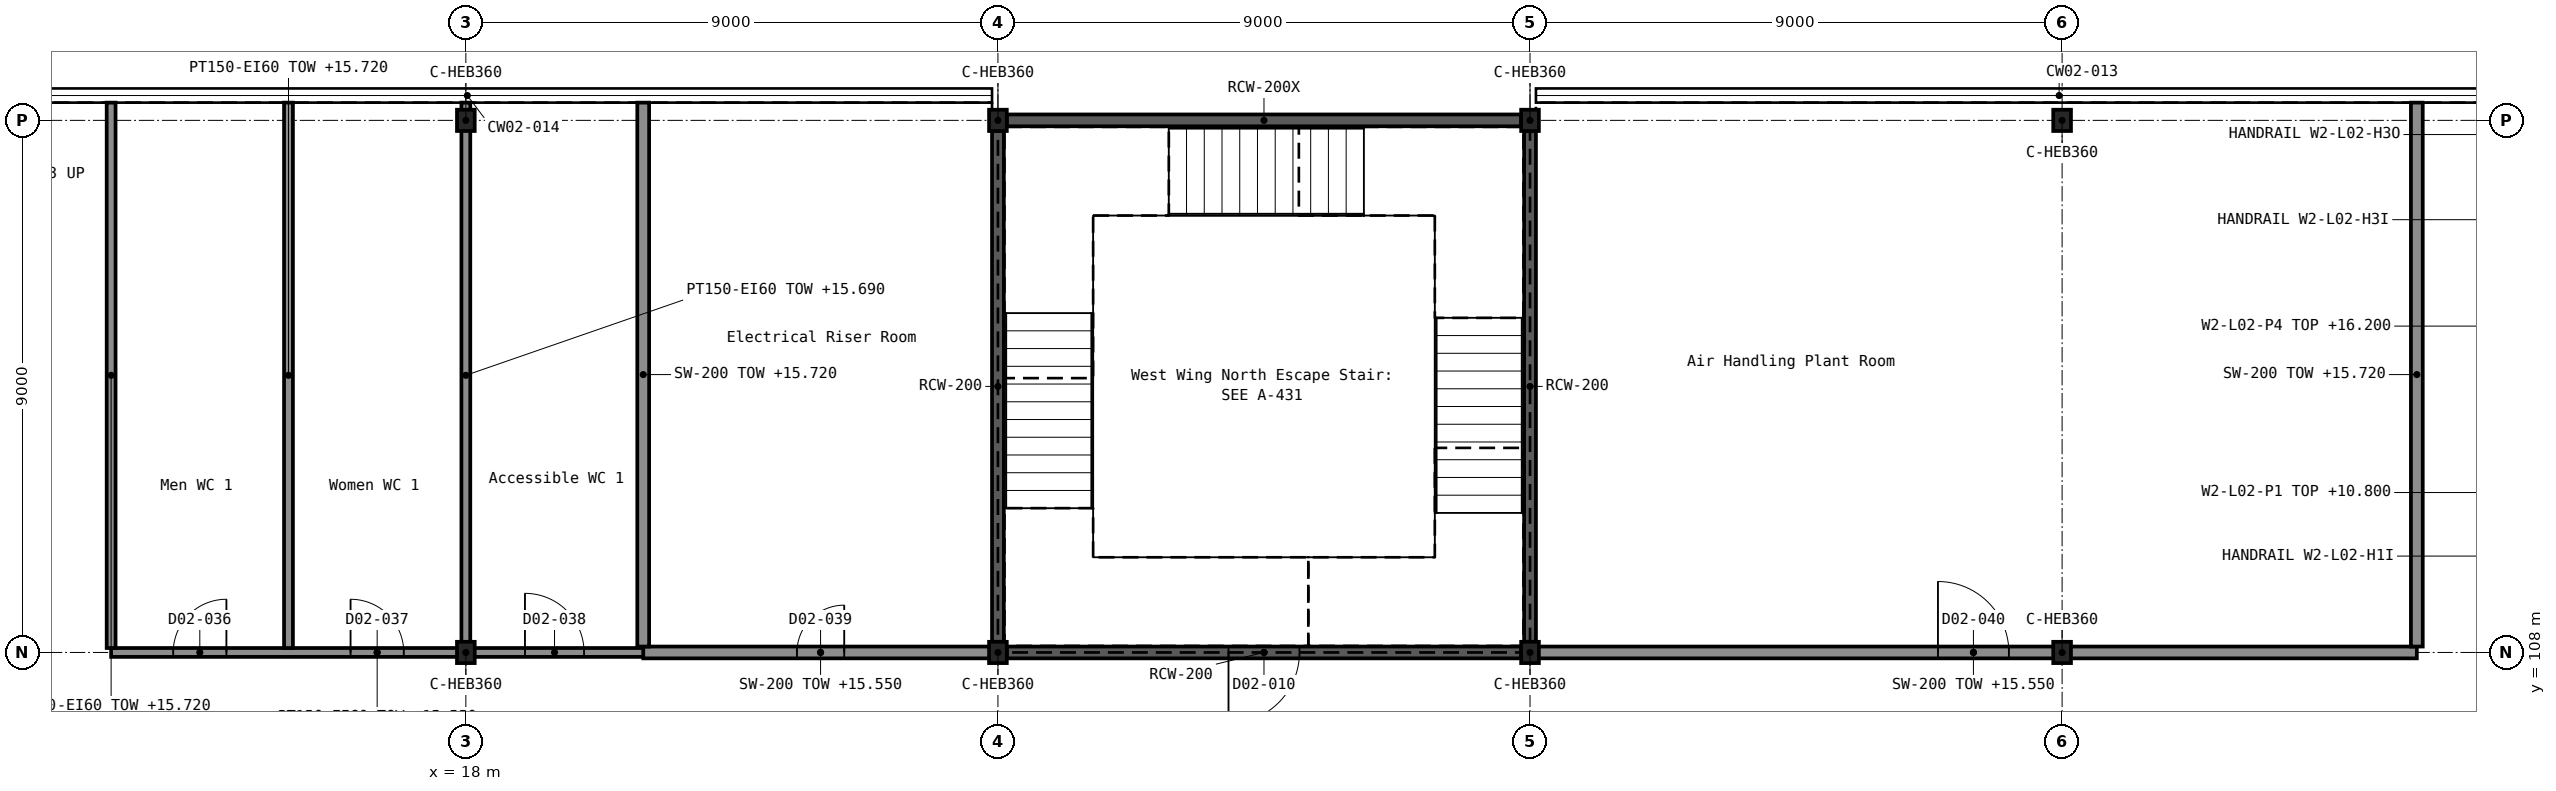
"""IFC4 building model, lengths in metres.
Left out: names, types, materials, properties, quantities, classifications, styles, units other than length and angle.
Written with IfcOpenShell. Run it as: python <this file> out.ifc"""

import sys

from ifc_helpers import new_model, si_unit, direction, frame, frame_2d, origin, origin_2d, place, context, subcontext, project, spatial, rectangle, i_section, extrude, element, fill, save


model = new_model("IFC4")
c1 = context("Model", 3, precision=1e-05, world=origin(), true_north=direction((0.0, 1.0)))
c2 = subcontext(c1, "Body", "Model", "MODEL_VIEW")
j1 = project(units=[si_unit("LENGTHUNIT", "METRE"), si_unit("PLANEANGLEUNIT", "RADIAN")], contexts=[c1])
p1 = place(None, origin())
s1 = spatial("IfcSite", under=j1, at=p1, CompositionType="ELEMENT")
p2 = place(p1, origin())
s2 = spatial("IfcBuilding", under=s1, at=p2, CompositionType="ELEMENT")
p3 = place(p2, frame((0.0, 0.0, 10.8)))
s3 = spatial("IfcBuildingStorey", under=s2, at=p3, CompositionType="ELEMENT", Elevation=10.8)
for number, where, z_axis, x_axis in (
    (1, (18.0, 108.0, 0.0), (0.0, 0.0, 1.0), (1.0, 0.0, 0.0)),
    (2, (27.0, 108.0, 0.0), (0.0, 0.0, 1.0), (1.0, 0.0, 0.0)),
    (3, (36.0, 108.0, 0.0), (0.0, 0.0, 1.0), (1.0, 0.0, 0.0)),
    (4, (45.0, 108.0, 0.0), (0.0, 0.0, 1.0), (1.0, 0.0, 0.0)),
    (5, (18.0, 117.0, 0.0), (0.0, 0.0, 1.0), (1.0, 0.0, 0.0)),
    (6, (27.0, 117.0, 0.0), (0.0, 0.0, 1.0), (1.0, 0.0, 0.0)),
    (7, (36.0, 117.0, 0.0), (0.0, 0.0, 1.0), (1.0, 0.0, 0.0)),
    (8, (45.0, 117.0, 0.0), (0.0, 0.0, 1.0), (1.0, 0.0, 0.0)),
):
    element("IfcColumn", number, at=place(p3, frame(where, z_axis=z_axis, x_axis=x_axis)), inside=s3, PredefinedType="COLUMN", context=c2, shape_type="SweptSolid", body=[
        extrude(i_section(OverallWidth=0.3, OverallDepth=0.36, WebThickness=0.012, FlangeThickness=0.022, FilletRadius=0.027, at=origin_2d()), origin(), (0.0, 0.0, 1.0), 5.4),
    ])
p4 = place(p3, frame((27.15, 108.0, 0.0), z_axis=(0.0, 0.0, 1.0), x_axis=(1.0, 0.0, 0.0)))
e9 = element("IfcWall", 9, at=p4, inside=s3, PredefinedType="SHEAR", context=c2, shape_type="SweptSolid", body=[
    extrude(rectangle(XDim=8.7, YDim=0.2, at=frame_2d((4.35, 0.0))), origin(), (0.0, 0.0, 1.0), 5.4),
])
p5 = place(p4, frame((3.75, 0.0, 0.0)))
e10 = element("IfcOpeningElement", 10, at=p5, cuts=e9, PredefinedType="OPENING", context=c2, shape_type="SweptSolid", body=[
    extrude(rectangle(XDim=1.2, YDim=2.1, at=frame_2d((0.6, 1.05))), frame((0.0, 0.111, 0.0), z_axis=(0.0, -1.0, 0.0), x_axis=(1.0, 0.0, 0.0)), (0.0, 0.0, 1.0), 0.222),
])
p6 = place(p3, frame((27.15, 117.0, 0.0), z_axis=(0.0, 0.0, 1.0), x_axis=(1.0, 0.0, 0.0)))
e11 = element("IfcWall", 11, at=p6, inside=s3, PredefinedType="SHEAR", context=c2, shape_type="SweptSolid", body=[
    extrude(rectangle(XDim=8.7, YDim=0.2, at=frame_2d((4.35, 0.0))), origin(), (0.0, 0.0, 1.0), 5.4),
])
for number, where, z_axis, x_axis in (
    (12, (27.0, 108.18, 0.0), (0.0, 0.0, 1.0), (0.0, 1.0, 0.0)),
    (13, (36.0, 108.18, 0.0), (0.0, 0.0, 1.0), (0.0, 1.0, 0.0)),
):
    element("IfcWall", number, at=place(p3, frame(where, z_axis=z_axis, x_axis=x_axis)), inside=s3, PredefinedType="SHEAR", context=c2, shape_type="SweptSolid", body=[
        extrude(rectangle(XDim=8.64, YDim=0.2, at=frame_2d((4.32, 0.0))), origin(), (0.0, 0.0, 1.0), 5.4),
    ])
p7 = place(p3, frame((21.0, 108.0, 0.0), z_axis=(0.0, 0.0, 1.0), x_axis=(1.0, 0.0, 0.0)))
e14 = element("IfcWall", 14, at=p7, inside=s3, PredefinedType="SOLIDWALL", context=c2, shape_type="SweptSolid", body=[
    extrude(rectangle(XDim=6.0, YDim=0.2, at=frame_2d((3.0, 0.0))), origin(), (0.0, 0.0, 1.0), 4.75),
])
p8 = place(p7, frame((2.6, 0.0, 0.0)))
e15 = element("IfcOpeningElement", 15, at=p8, cuts=e14, PredefinedType="OPENING", context=c2, shape_type="SweptSolid", body=[
    extrude(rectangle(XDim=0.8, YDim=2.1, at=frame_2d((0.4, 1.05))), frame((0.0, 0.111, 0.0), z_axis=(0.0, -1.0, 0.0), x_axis=(1.0, 0.0, 0.0)), (0.0, 0.0, 1.0), 0.222),
])
p9 = place(p3, frame((36.0, 108.0, 0.0), z_axis=(0.0, 0.0, 1.0), x_axis=(1.0, 0.0, 0.0)))
e16 = element("IfcWall", 16, at=p9, inside=s3, PredefinedType="SOLIDWALL", context=c2, shape_type="SweptSolid", body=[
    extrude(rectangle(XDim=15.0, YDim=0.2, at=frame_2d((7.5, 0.0))), origin(), (0.0, 0.0, 1.0), 4.75),
])
p10 = place(p9, frame((6.9, 0.0, 0.0)))
e17 = element("IfcOpeningElement", 17, at=p10, cuts=e16, PredefinedType="OPENING", context=c2, shape_type="SweptSolid", body=[
    extrude(rectangle(XDim=1.2, YDim=2.4, at=frame_2d((0.6, 1.2))), frame((0.0, 0.111, 0.0), z_axis=(0.0, -1.0, 0.0), x_axis=(1.0, 0.0, 0.0)), (0.0, 0.0, 1.0), 0.222),
])
for number, where, z_axis, x_axis in (
    (18, (21.0, 108.1, 0.0), (0.0, 0.0, 1.0), (0.0, 1.0, 0.0)),
    (19, (51.0, 108.1, 0.0), (0.0, 0.0, 1.0), (0.0, 1.0, 0.0)),
):
    element("IfcWall", number, at=place(p3, frame(where, z_axis=z_axis, x_axis=x_axis)), inside=s3, PredefinedType="SOLIDWALL", context=c2, shape_type="SweptSolid", body=[
        extrude(rectangle(XDim=9.2, YDim=0.2, at=frame_2d((4.6, 0.0))), origin(), (0.0, 0.0, 1.0), 4.92),
    ])
p11 = place(p3, frame((12.0, 108.0, 0.0), z_axis=(0.0, 0.0, 1.0), x_axis=(1.0, 0.0, 0.0)))
e20 = element("IfcWall", 20, at=p11, inside=s3, PredefinedType="PARTITIONING", context=c2, shape_type="SweptSolid", body=[
    extrude(rectangle(XDim=9.0, YDim=0.15, at=frame_2d((4.5, 0.0))), origin(), (0.0, 0.0, 1.0), 4.75),
])
p12 = place(p11, frame((1.05, 0.0, 0.0)))
e21 = element("IfcOpeningElement", 21, at=p12, cuts=e20, PredefinedType="OPENING", context=c2, shape_type="SweptSolid", body=[
    extrude(rectangle(XDim=0.9, YDim=2.1, at=frame_2d((0.45, 1.05))), frame((0.0, 0.086, 0.0), z_axis=(0.0, -1.0, 0.0), x_axis=(1.0, 0.0, 0.0)), (0.0, 0.0, 1.0), 0.172),
])
p13 = place(p11, frame((4.05, 0.0, 0.0)))
e22 = element("IfcOpeningElement", 22, at=p13, cuts=e20, PredefinedType="OPENING", context=c2, shape_type="SweptSolid", body=[
    extrude(rectangle(XDim=0.9, YDim=2.1, at=frame_2d((0.45, 1.05))), frame((0.0, 0.086, 0.0), z_axis=(0.0, -1.0, 0.0), x_axis=(1.0, 0.0, 0.0)), (0.0, 0.0, 1.0), 0.172),
])
p14 = place(p11, frame((7.0, 0.0, 0.0)))
e23 = element("IfcOpeningElement", 23, at=p14, cuts=e20, PredefinedType="OPENING", context=c2, shape_type="SweptSolid", body=[
    extrude(rectangle(XDim=1.0, YDim=2.1, at=frame_2d((0.5, 1.05))), frame((0.0, 0.086, 0.0), z_axis=(0.0, -1.0, 0.0), x_axis=(1.0, 0.0, 0.0)), (0.0, 0.0, 1.0), 0.172),
])
for number, where, z_axis, x_axis in (
    (24, (12.0, 108.075, 0.0), (0.0, 0.0, 1.0), (0.0, 1.0, 0.0)),
    (25, (15.0, 108.075, 0.0), (0.0, 0.0, 1.0), (0.0, 1.0, 0.0)),
):
    element("IfcWall", number, at=place(p3, frame(where, z_axis=z_axis, x_axis=x_axis)), inside=s3, PredefinedType="PARTITIONING", context=c2, shape_type="SweptSolid", body=[
        extrude(rectangle(XDim=9.225, YDim=0.15, at=frame_2d((4.613, 0.0))), origin(), (0.0, 0.0, 1.0), 4.92),
    ])
p15 = place(p3, frame((18.0, 108.075, 0.0), z_axis=(0.0, 0.0, 1.0), x_axis=(0.0, 1.0, 0.0)))
e26 = element("IfcWall", 26, at=p15, inside=s3, PredefinedType="PARTITIONING", context=c2, shape_type="SweptSolid", body=[
    extrude(rectangle(XDim=9.225, YDim=0.15, at=frame_2d((4.613, 0.0))), origin(), (0.0, 0.0, 1.0), 4.89),
])
p16 = place(p5, frame((1.2, 0.0, 0.0), z_axis=(0.0, 0.0, 1.0), x_axis=(-1.0, 0.0, 0.0)))
e27 = element("IfcDoor", 27, at=p16, inside=s3, OperationType="SINGLE_SWING_RIGHT", PredefinedType="DOOR", context=c2, shape_type="SweptSolid", body=[
    extrude(rectangle(XDim=1.2, YDim=2.1, at=frame_2d((0.6, 1.05))), frame((0.0, 0.025, 0.0), z_axis=(0.0, -1.0, 0.0), x_axis=(1.0, 0.0, 0.0)), (0.0, 0.0, 1.0), 0.05),
])
fill(e10, e27)
p17 = place(p12, origin())
e28 = element("IfcDoor", 28, at=p17, inside=s3, OperationType="SINGLE_SWING_RIGHT", PredefinedType="DOOR", context=c2, shape_type="SweptSolid", body=[
    extrude(rectangle(XDim=0.9, YDim=2.1, at=frame_2d((0.45, 1.05))), frame((0.0, 0.025, 0.0), z_axis=(0.0, -1.0, 0.0), x_axis=(1.0, 0.0, 0.0)), (0.0, 0.0, 1.0), 0.05),
])
fill(e21, e28)
p18 = place(p13, origin())
e29 = element("IfcDoor", 29, at=p18, inside=s3, OperationType="SINGLE_SWING_LEFT", PredefinedType="DOOR", context=c2, shape_type="SweptSolid", body=[
    extrude(rectangle(XDim=0.9, YDim=2.1, at=frame_2d((0.45, 1.05))), frame((0.0, 0.025, 0.0), z_axis=(0.0, -1.0, 0.0), x_axis=(1.0, 0.0, 0.0)), (0.0, 0.0, 1.0), 0.05),
])
fill(e22, e29)
p19 = place(p14, origin())
e30 = element("IfcDoor", 30, at=p19, inside=s3, OperationType="SINGLE_SWING_LEFT", PredefinedType="DOOR", context=c2, shape_type="SweptSolid", body=[
    extrude(rectangle(XDim=1.0, YDim=2.1, at=frame_2d((0.5, 1.05))), frame((0.0, 0.025, 0.0), z_axis=(0.0, -1.0, 0.0), x_axis=(1.0, 0.0, 0.0)), (0.0, 0.0, 1.0), 0.05),
])
fill(e23, e30)
p20 = place(p8, origin())
e31 = element("IfcDoor", 31, at=p20, inside=s3, OperationType="SINGLE_SWING_RIGHT", PredefinedType="DOOR", context=c2, shape_type="SweptSolid", body=[
    extrude(rectangle(XDim=0.8, YDim=2.1, at=frame_2d((0.4, 1.05))), frame((0.0, 0.025, 0.0), z_axis=(0.0, -1.0, 0.0), x_axis=(1.0, 0.0, 0.0)), (0.0, 0.0, 1.0), 0.05),
])
fill(e15, e31)
p21 = place(p10, origin())
e32 = element("IfcDoor", 32, at=p21, inside=s3, OperationType="SINGLE_SWING_LEFT", PredefinedType="DOOR", context=c2, shape_type="SweptSolid", body=[
    extrude(rectangle(XDim=1.2, YDim=2.4, at=frame_2d((0.6, 1.2))), frame((0.0, 0.025, 0.0), z_axis=(0.0, -1.0, 0.0), x_axis=(1.0, 0.0, 0.0)), (0.0, 0.0, 1.0), 0.05),
])
fill(e17, e32)
save(model, sys.argv[1])
